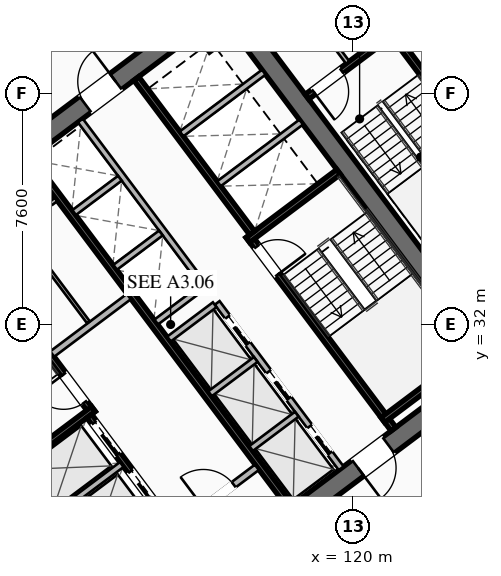
"""IFC4 building model, lengths in metres.
Left out: names, types, materials, properties, quantities, classifications, styles, units other than length and angle.
Written with IfcOpenShell. Run it as: python <this file> out.ifc"""

import sys

from ifc_helpers import new_model, si_unit, direction, frame, frame_2d, origin, place, context, subcontext, project, spatial, rectangle, extrude, element, fill, save


model = new_model("IFC4")
c1 = context("Model", 3, precision=1e-05, world=origin(), true_north=direction((0.0, 1.0)))
c2 = subcontext(c1, "Body", "Model", "MODEL_VIEW")
j1 = project(units=[si_unit("LENGTHUNIT", "METRE"), si_unit("PLANEANGLEUNIT", "RADIAN")], contexts=[c1])
p1 = place(None, origin())
s1 = spatial("IfcSite", under=j1, at=p1, CompositionType="ELEMENT")
p2 = place(p1, origin())
s2 = spatial("IfcBuilding", under=s1, at=p2, CompositionType="ELEMENT")
p3 = place(p2, frame((0.0, 0.0, 81.4)))
s3 = spatial("IfcBuildingStorey", under=s2, at=p3, CompositionType="ELEMENT", Elevation=81.4)
for number, where, z_axis, x_axis in (
    (1, (112.476, 21.107, 0.0), (0.0, 0.0, 1.0), (-0.6, 0.8, 0.0)),
    (2, (115.524, 42.893, 0.0), (0.0, 0.0, 1.0), (0.6, -0.8, 0.0)),
):
    element("IfcWall", number, at=place(p3, frame(where, z_axis=z_axis, x_axis=x_axis)), inside=s3, PredefinedType="SHEAR", context=c2, shape_type="SweptSolid", body=[
        extrude(rectangle(XDim=15.6, YDim=0.65, at=frame_2d((7.8, 0.0))), origin(), (0.0, 0.0, 1.0), 3.55),
    ])
p4 = place(p3, frame((124.429, 30.478, 0.0), z_axis=(0.0, 0.0, 1.0), x_axis=(-0.799998028465, -0.600002628705, 0.0)))
e3 = element("IfcWall", 3, at=p4, inside=s3, PredefinedType="SHEAR", context=c2, shape_type="SweptSolid", body=[
    extrude(rectangle(XDim=14.86, YDim=0.65, at=frame_2d((7.43, 0.0))), origin(), (0.0, 0.0, 1.0), 3.55),
])
p5 = place(p4, frame((9.13, 0.0, 0.0)))
e4 = element("IfcOpeningElement", 4, at=p5, cuts=e3, PredefinedType="OPENING", context=c2, shape_type="SweptSolid", body=[
    extrude(rectangle(XDim=1.25, YDim=2.25, at=frame_2d((0.625, 1.125))), frame((0.0, 0.335, 0.0), z_axis=(0.0, -1.0, 0.0), x_axis=(1.0, 0.0, 0.0)), (0.0, 0.0, 1.0), 0.67),
])
p6 = place(p4, frame((4.08, 0.0, 0.0)))
e5 = element("IfcOpeningElement", 5, at=p6, cuts=e3, PredefinedType="OPENING", context=c2, shape_type="SweptSolid", body=[
    extrude(rectangle(XDim=1.25, YDim=2.25, at=frame_2d((0.625, 1.125))), frame((0.0, 0.335, 0.0), z_axis=(0.0, -1.0, 0.0), x_axis=(1.0, 0.0, 0.0)), (0.0, 0.0, 1.0), 0.67),
])
p7 = place(p3, frame((103.571, 33.522, 0.0), z_axis=(0.0, 0.0, 1.0), x_axis=(0.799998028465, 0.600002628705, 0.0)))
e6 = element("IfcWall", 6, at=p7, inside=s3, PredefinedType="SHEAR", context=c2, shape_type="SweptSolid", body=[
    extrude(rectangle(XDim=14.86, YDim=0.65, at=frame_2d((7.43, 0.0))), origin(), (0.0, 0.0, 1.0), 3.55),
])
p8 = place(p7, frame((4.48, 0.0, 0.0)))
e7 = element("IfcOpeningElement", 7, at=p8, cuts=e6, PredefinedType="OPENING", context=c2, shape_type="SweptSolid", body=[
    extrude(rectangle(XDim=1.25, YDim=2.25, at=frame_2d((0.625, 1.125))), frame((0.0, 0.335, 0.0), z_axis=(0.0, -1.0, 0.0), x_axis=(1.0, 0.0, 0.0)), (0.0, 0.0, 1.0), 0.67),
])
p9 = place(p7, frame((9.53, 0.0, 0.0)))
e8 = element("IfcOpeningElement", 8, at=p9, cuts=e6, PredefinedType="OPENING", context=c2, shape_type="SweptSolid", body=[
    extrude(rectangle(XDim=1.25, YDim=2.25, at=frame_2d((0.625, 1.125))), frame((0.0, 0.335, 0.0), z_axis=(0.0, -1.0, 0.0), x_axis=(1.0, 0.0, 0.0)), (0.0, 0.0, 1.0), 0.67),
])
p10 = place(p3, frame((111.44, 29.08, 0.0), z_axis=(0.0, 0.0, 1.0), x_axis=(-0.600009827119, 0.799992629566, 0.0)))
e9 = element("IfcWall", 9, at=p10, inside=s3, PredefinedType="SHEAR", context=c2, shape_type="SweptSolid", body=[
    extrude(rectangle(XDim=7.95, YDim=0.2, at=frame_2d((3.975, 0.0))), origin(), (0.0, 0.0, 1.0), 3.35),
])
p11 = place(p10, frame((0.45, 0.0, 0.0)))
e10 = element("IfcOpeningElement", 10, at=p11, cuts=e9, PredefinedType="OPENING", context=c2, shape_type="SweptSolid", body=[
    extrude(rectangle(XDim=1.15, YDim=2.2, at=frame_2d((0.575, 1.1))), frame((0.0, 0.11, 0.0), z_axis=(0.0, -1.0, 0.0), x_axis=(1.0, 0.0, 0.0)), (0.0, 0.0, 1.0), 0.22),
])
p12 = place(p3, frame((108.476, 26.982, 0.0), z_axis=(0.0, 0.0, 1.0), x_axis=(0.799984290658, 0.600020945218, 0.0)))
e11 = element("IfcWall", 11, at=p12, inside=s3, PredefinedType="SHEAR", context=c2, shape_type="SweptSolid", body=[
    extrude(rectangle(XDim=3.73, YDim=0.2, at=frame_2d((1.865, 0.0))), origin(), (0.0, 0.0, 1.0), 3.35),
])
p13 = place(p3, frame((116.56, 34.92, 0.0), z_axis=(0.0, 0.0, 1.0), x_axis=(0.600009827119, -0.799992629566, 0.0)))
e12 = element("IfcWall", 12, at=p13, inside=s3, PredefinedType="SHEAR", context=c2, shape_type="SweptSolid", body=[
    extrude(rectangle(XDim=7.95, YDim=0.2, at=frame_2d((3.975, 0.0))), origin(), (0.0, 0.0, 1.0), 3.35),
])
p14 = place(p13, frame((0.45, 0.0, 0.0)))
e13 = element("IfcOpeningElement", 13, at=p14, cuts=e12, PredefinedType="OPENING", context=c2, shape_type="SweptSolid", body=[
    extrude(rectangle(XDim=1.15, YDim=2.2, at=frame_2d((0.575, 1.1))), frame((0.0, 0.11, 0.0), z_axis=(0.0, -1.0, 0.0), x_axis=(1.0, 0.0, 0.0)), (0.0, 0.0, 1.0), 0.22),
])
for number, where, z_axis, x_axis in (
    (14, (116.54, 34.78, 0.0), (0.0, 0.0, 1.0), (0.8, 0.6, 0.0)),
    (15, (120.98, 28.86, 0.0), (0.0, 0.0, 1.0), (0.8, 0.6, 0.0)),
):
    element("IfcWall", number, at=place(p3, frame(where, z_axis=z_axis, x_axis=x_axis)), inside=s3, PredefinedType="SHEAR", context=c2, shape_type="SweptSolid", body=[
        extrude(rectangle(XDim=3.73, YDim=0.2, at=frame_2d((1.865, 0.0))), origin(), (0.0, 0.0, 1.0), 3.35),
    ])
p15 = place(p3, frame((117.938, 26.016, 0.0), z_axis=(0.0, 0.0, 1.0), x_axis=(-0.600005463273, 0.799995902516, 0.0)))
e16 = element("IfcWall", 16, at=p15, inside=s3, PredefinedType="SHEAR", context=c2, shape_type="SweptSolid", body=[
    extrude(rectangle(XDim=14.3, YDim=0.2, at=frame_2d((7.15, 0.0))), origin(), (0.0, 0.0, 1.0), 3.35),
])
p16 = place(p3, frame((110.104, 31.028, 0.0), z_axis=(0.0, 0.0, 1.0), x_axis=(0.800018601094, 0.59997519774, 0.0)))
e17 = element("IfcWall", 17, at=p16, inside=s3, PredefinedType="SOLIDWALL", context=c2, shape_type="SweptSolid", body=[
    extrude(rectangle(XDim=3.15, YDim=0.22, at=frame_2d((1.575, 0.0))), origin(), (0.0, 0.0, 1.0), 2.703),
])
p17 = place(p3, frame((114.316, 25.412, 0.0), z_axis=(0.0, 0.0, 1.0), x_axis=(0.800018601094, 0.59997519774, 0.0)))
e18 = element("IfcWall", 18, at=p17, inside=s3, PredefinedType="SOLIDWALL", context=c2, shape_type="SweptSolid", body=[
    extrude(rectangle(XDim=3.15, YDim=0.22, at=frame_2d((1.575, 0.0))), origin(), (0.0, 0.0, 1.0), 2.703),
])
p18 = place(p17, frame((0.95, 0.0, 0.0)))
e19 = element("IfcOpeningElement", 19, at=p18, cuts=e18, PredefinedType="OPENING", context=c2, shape_type="SweptSolid", body=[
    extrude(rectangle(XDim=1.25, YDim=2.25, at=frame_2d((0.625, 1.125))), frame((0.0, 0.12, 0.0), z_axis=(0.0, -1.0, 0.0), x_axis=(1.0, 0.0, 0.0)), (0.0, 0.0, 1.0), 0.24),
])
p19 = place(p3, frame((115.13, 23.91, 0.0), z_axis=(0.0, 0.0, 1.0), x_axis=(-0.599975393228, 0.800018454488, 0.0)))
e20 = element("IfcWall", 20, at=p19, inside=s3, PredefinedType="SHEAR", context=c2, shape_type="SweptSolid", body=[
    extrude(rectangle(XDim=6.35, YDim=0.2, at=frame_2d((3.175, 0.0))), origin(), (0.0, 0.0, 1.0), 3.35),
])
p20 = place(p19, frame((4.775, 0.0, 0.0)))
e21 = element("IfcOpeningElement", 21, at=p20, cuts=e20, PredefinedType="OPENING", context=c2, shape_type="SweptSolid", body=[
    extrude(rectangle(XDim=1.3, YDim=2.25, at=frame_2d((0.65, 1.125))), frame((0.0, 0.11, 0.0), z_axis=(0.0, -1.0, 0.0), x_axis=(1.0, 0.0, 0.0)), (0.0, 0.0, 1.0), 0.22),
])
p21 = place(p19, frame((2.775, 0.0, 0.0)))
e22 = element("IfcOpeningElement", 22, at=p21, cuts=e20, PredefinedType="OPENING", context=c2, shape_type="SweptSolid", body=[
    extrude(rectangle(XDim=1.3, YDim=2.25, at=frame_2d((0.65, 1.125))), frame((0.0, 0.11, 0.0), z_axis=(0.0, -1.0, 0.0), x_axis=(1.0, 0.0, 0.0)), (0.0, 0.0, 1.0), 0.22),
])
p22 = place(p19, frame((0.575, 0.0, 0.0)))
e23 = element("IfcOpeningElement", 23, at=p22, cuts=e20, PredefinedType="OPENING", context=c2, shape_type="SweptSolid", body=[
    extrude(rectangle(XDim=1.3, YDim=2.25, at=frame_2d((0.65, 1.125))), frame((0.0, 0.11, 0.0), z_axis=(0.0, -1.0, 0.0), x_axis=(1.0, 0.0, 0.0)), (0.0, 0.0, 1.0), 0.22),
])
p23 = place(p3, frame((109.688, 25.366, 0.0), z_axis=(0.0, 0.0, 1.0), x_axis=(0.8, 0.6, 0.0)))
e24 = element("IfcWall", 24, at=p23, inside=s3, PredefinedType="SOLIDWALL", context=c2, shape_type="SweptSolid", body=[
    extrude(rectangle(XDim=3.38, YDim=0.2, at=frame_2d((1.69, 0.0))), origin(), (0.0, 0.0, 1.0), 3.35),
])
p24 = place(p3, frame((112.87, 40.09, 0.0), z_axis=(0.0, 0.0, 1.0), x_axis=(0.599975393228, -0.800018454488, 0.0)))
e25 = element("IfcWall", 25, at=p24, inside=s3, PredefinedType="SHEAR", context=c2, shape_type="SweptSolid", body=[
    extrude(rectangle(XDim=6.35, YDim=0.2, at=frame_2d((3.175, 0.0))), origin(), (0.0, 0.0, 1.0), 3.35),
])
for number, where, z_axis, x_axis in (
    (26, (115.59, 36.63, 0.0), (0.0, 0.0, 1.0), (0.8, 0.6, 0.0)),
    (27, (114.36, 38.27, 0.0), (0.0, 0.0, 1.0), (0.8, 0.6, 0.0)),
):
    element("IfcWall", number, at=place(p3, frame(where, z_axis=z_axis, x_axis=x_axis)), inside=s3, PredefinedType="SOLIDWALL", context=c2, shape_type="SweptSolid", body=[
        extrude(rectangle(XDim=3.38, YDim=0.2, at=frame_2d((1.69, 0.0))), origin(), (0.0, 0.0, 1.0), 3.35),
    ])
p25 = place(p3, frame((107.71, 34.22, 0.0), z_axis=(0.0, 0.0, 1.0), x_axis=(0.799981399002, 0.60002480053, 0.0)))
e28 = element("IfcWall", 28, at=p25, inside=s3, PredefinedType="PARTITIONING", context=c2, shape_type="SweptSolid", body=[
    extrude(rectangle(XDim=3.15, YDim=0.135, at=frame_2d((1.575, 0.0))), origin(), (0.0, 0.0, 1.0), 2.703),
])
p26 = place(p25, frame((0.25, 0.0, 0.0)))
e29 = element("IfcOpeningElement", 29, at=p26, cuts=e28, PredefinedType="OPENING", context=c2, shape_type="SweptSolid", body=[
    extrude(rectangle(XDim=0.95, YDim=2.05, at=frame_2d((0.475, 1.025))), frame((0.0, 0.077, 0.0), z_axis=(0.0, -1.0, 0.0), x_axis=(1.0, 0.0, 0.0)), (0.0, 0.0, 1.0), 0.155),
])
p27 = place(p25, frame((1.95, 0.0, 0.0)))
e30 = element("IfcOpeningElement", 30, at=p27, cuts=e28, PredefinedType="OPENING", context=c2, shape_type="SweptSolid", body=[
    extrude(rectangle(XDim=0.95, YDim=2.05, at=frame_2d((0.475, 1.025))), frame((0.0, 0.077, 0.0), z_axis=(0.0, -1.0, 0.0), x_axis=(1.0, 0.0, 0.0)), (0.0, 0.0, 1.0), 0.155),
])
p28 = place(p3, frame((111.296, 32.072, 0.0), z_axis=(0.0, 0.0, 1.0), x_axis=(-0.59995887973, 0.800030838552, 0.0)))
e31 = element("IfcWall", 31, at=p28, inside=s3, PredefinedType="PARTITIONING", context=c2, shape_type="SweptSolid", body=[
    extrude(rectangle(XDim=3.8, YDim=0.11, at=frame_2d((1.9, 0.0))), origin(), (0.0, 0.0, 1.0), 2.703),
])
p29 = place(p3, frame((119.61, 27.27, 0.0), z_axis=(0.0, 0.0, 1.0), x_axis=(-0.600011488909, 0.79999138319, 0.0)))
e32 = element("IfcWall", 32, at=p29, inside=s3, PredefinedType="SOLIDWALL", context=c2, shape_type="SweptSolid", body=[
    extrude(rectangle(XDim=6.8, YDim=0.2, at=frame_2d((3.4, 0.0))), origin(), (0.0, 0.0, 1.0), 3.35),
])
p30 = place(p29, frame((0.625, 0.0, 0.0)))
e33 = element("IfcOpeningElement", 33, at=p30, cuts=e32, PredefinedType="OPENING", context=c2, shape_type="SweptSolid", body=[
    extrude(rectangle(XDim=1.1, YDim=2.2, at=frame_2d((0.55, 1.1))), frame((0.0, 0.11, 0.0), z_axis=(0.0, -1.0, 0.0), x_axis=(1.0, 0.0, 0.0)), (0.0, 0.0, 1.0), 0.22),
])
p31 = place(p29, frame((2.875, 0.0, 0.0)))
e34 = element("IfcOpeningElement", 34, at=p31, cuts=e32, PredefinedType="OPENING", context=c2, shape_type="SweptSolid", body=[
    extrude(rectangle(XDim=1.1, YDim=2.2, at=frame_2d((0.55, 1.1))), frame((0.0, 0.11, 0.0), z_axis=(0.0, -1.0, 0.0), x_axis=(1.0, 0.0, 0.0)), (0.0, 0.0, 1.0), 0.22),
])
p32 = place(p29, frame((5.125, 0.0, 0.0)))
e35 = element("IfcOpeningElement", 35, at=p32, cuts=e32, PredefinedType="OPENING", context=c2, shape_type="SweptSolid", body=[
    extrude(rectangle(XDim=1.1, YDim=2.2, at=frame_2d((0.55, 1.1))), frame((0.0, 0.11, 0.0), z_axis=(0.0, -1.0, 0.0), x_axis=(1.0, 0.0, 0.0)), (0.0, 0.0, 1.0), 0.22),
])
p33 = place(p3, frame((116.646, 27.922, 0.0), z_axis=(0.0, 0.0, 1.0), x_axis=(0.8, 0.6, 0.0)))
e36 = element("IfcWall", 36, at=p33, inside=s3, PredefinedType="SOLIDWALL", context=c2, shape_type="SweptSolid", body=[
    extrude(rectangle(XDim=1.88, YDim=0.2, at=frame_2d((0.94, 0.0))), origin(), (0.0, 0.0, 1.0), 3.35),
])
p34 = place(p3, frame((115.296, 29.722, 0.0), z_axis=(0.0, 0.0, 1.0), x_axis=(0.799984418148, 0.600020775241, 0.0)))
e37 = element("IfcWall", 37, at=p34, inside=s3, PredefinedType="SOLIDWALL", context=c2, shape_type="SweptSolid", body=[
    extrude(rectangle(XDim=1.88, YDim=0.2, at=frame_2d((0.94, 0.0))), origin(), (0.0, 0.0, 1.0), 3.35),
])
p35 = place(p3, frame((113.946, 31.522, 0.0), z_axis=(0.0, 0.0, 1.0), x_axis=(0.8, 0.6, 0.0)))
e38 = element("IfcWall", 38, at=p35, inside=s3, PredefinedType="SOLIDWALL", context=c2, shape_type="SweptSolid", body=[
    extrude(rectangle(XDim=1.88, YDim=0.2, at=frame_2d((0.94, 0.0))), origin(), (0.0, 0.0, 1.0), 3.35),
])
p36 = place(p3, frame((115.11, 33.27, 0.0), z_axis=(0.0, 0.0, 1.0), x_axis=(-0.600011488909, 0.79999138319, 0.0)))
e39 = element("IfcWall", 39, at=p36, inside=s3, PredefinedType="SOLIDWALL", context=c2, shape_type="SweptSolid", body=[
    extrude(rectangle(XDim=6.8, YDim=0.2, at=frame_2d((3.4, 0.0))), origin(), (0.0, 0.0, 1.0), 3.35),
])
p37 = place(p3, frame((113.526, 32.082, 0.0), z_axis=(0.0, 0.0, 1.0), x_axis=(0.800046745961, 0.599937666993, 0.0)))
e40 = element("IfcWall", 40, at=p37, inside=s3, PredefinedType="SOLIDWALL", context=c2, shape_type="SweptSolid", body=[
    extrude(rectangle(XDim=1.88, YDim=0.2, at=frame_2d((0.94, 0.0))), origin(), (0.0, 0.0, 1.0), 3.35),
])
p38 = place(p3, frame((112.176, 33.882, 0.0), z_axis=(0.0, 0.0, 1.0), x_axis=(0.8, 0.6, 0.0)))
e41 = element("IfcWall", 41, at=p38, inside=s3, PredefinedType="SOLIDWALL", context=c2, shape_type="SweptSolid", body=[
    extrude(rectangle(XDim=1.88, YDim=0.2, at=frame_2d((0.94, 0.0))), origin(), (0.0, 0.0, 1.0), 3.35),
])
p39 = place(p3, frame((110.826, 35.682, 0.0), z_axis=(0.0, 0.0, 1.0), x_axis=(0.799984418148, 0.600020775241, 0.0)))
e42 = element("IfcWall", 42, at=p39, inside=s3, PredefinedType="SOLIDWALL", context=c2, shape_type="SweptSolid", body=[
    extrude(rectangle(XDim=1.88, YDim=0.2, at=frame_2d((0.94, 0.0))), origin(), (0.0, 0.0, 1.0), 3.35),
])
p40 = place(p3, frame((125.304, 36.228, 0.0), z_axis=(0.0, 0.0, 1.0), x_axis=(-0.59998851072, 0.800008616831, 0.0)))
e43 = element("IfcWall", 43, at=p40, inside=s3, PredefinedType="SHEAR", context=c2, shape_type="SweptSolid", body=[
    extrude(rectangle(XDim=6.8, YDim=0.2, at=frame_2d((3.4, 0.0))), origin(), (0.0, 0.0, 1.0), 3.35),
])
p41 = place(p3, frame((121.204, 41.528, 0.0), z_axis=(0.0, 0.0, 1.0), x_axis=(-0.800017232136, -0.599977023131, 0.0)))
e44 = element("IfcWall", 44, at=p41, inside=s3, PredefinedType="SHEAR", context=c2, shape_type="SweptSolid", body=[
    extrude(rectangle(XDim=3.4, YDim=0.2, at=frame_2d((1.7, 0.0))), origin(), (0.0, 0.0, 1.0), 3.35),
])
p42 = place(p41, frame((1.975, 0.0, 0.0)))
e45 = element("IfcOpeningElement", 45, at=p42, cuts=e44, PredefinedType="OPENING", context=c2, shape_type="SweptSolid", body=[
    extrude(rectangle(XDim=1.15, YDim=2.2, at=frame_2d((0.575, 1.1))), frame((0.0, 0.11, 0.0), z_axis=(0.0, -1.0, 0.0), x_axis=(1.0, 0.0, 0.0)), (0.0, 0.0, 1.0), 0.22),
])
p43 = place(p3, frame((119.824, 40.618, 0.0), z_axis=(0.0, 0.0, 1.0), x_axis=(-0.599982243973, 0.800013316712, 0.0)))
e46 = element("IfcWall", 46, at=p43, inside=s3, PredefinedType="PARTITIONING", context=c2, shape_type="SweptSolid", body=[
    extrude(rectangle(XDim=4.4, YDim=0.135, at=frame_2d((2.2, 0.0))), origin(), (0.0, 0.0, 1.0), 2.703),
])
p44 = place(p3, frame((98.516, 34.012, 0.0), z_axis=(0.0, 0.0, 1.0), x_axis=(0.8, 0.6, 0.0)))
e47 = element("IfcWall", 47, at=p44, inside=s3, PredefinedType="PARTITIONING", context=c2, shape_type="SweptSolid", body=[
    extrude(rectangle(XDim=28.23, YDim=0.135, at=frame_2d((14.115, 0.0))), origin(), (0.0, 0.0, 1.0), 2.703),
])
p45 = place(p44, frame((0.3, 0.0, 0.0)))
e48 = element("IfcOpeningElement", 48, at=p45, cuts=e47, PredefinedType="OPENING", context=c2, shape_type="SweptSolid", body=[
    extrude(rectangle(XDim=0.95, YDim=2.05, at=frame_2d((0.475, 1.025))), frame((0.0, 0.077, 0.0), z_axis=(0.0, -1.0, 0.0), x_axis=(1.0, 0.0, 0.0)), (0.0, 0.0, 1.0), 0.155),
])
p46 = place(p44, frame((10.792, 0.0, 0.0)))
e49 = element("IfcOpeningElement", 49, at=p46, cuts=e47, PredefinedType="OPENING", context=c2, shape_type="SweptSolid", body=[
    extrude(rectangle(XDim=0.95, YDim=2.05, at=frame_2d((0.475, 1.025))), frame((0.0, 0.077, 0.0), z_axis=(0.0, -1.0, 0.0), x_axis=(1.0, 0.0, 0.0)), (0.0, 0.0, 1.0), 0.155),
])
p47 = place(p44, frame((26.98, 0.0, 0.0)))
e50 = element("IfcOpeningElement", 50, at=p47, cuts=e47, PredefinedType="OPENING", context=c2, shape_type="SweptSolid", body=[
    extrude(rectangle(XDim=0.95, YDim=2.05, at=frame_2d((0.475, 1.025))), frame((0.0, 0.077, 0.0), z_axis=(0.0, -1.0, 0.0), x_axis=(1.0, 0.0, 0.0)), (0.0, 0.0, 1.0), 0.155),
])
p48 = place(p3, frame((134.402, 33.214, 0.0), z_axis=(0.0, 0.0, 1.0), x_axis=(-0.799995848831, -0.600005534853, 0.0)))
e51 = element("IfcWall", 51, at=p48, inside=s3, PredefinedType="PARTITIONING", context=c2, shape_type="SweptSolid", body=[
    extrude(rectangle(XDim=28.23, YDim=0.135, at=frame_2d((14.115, 0.0))), origin(), (0.0, 0.0, 1.0), 2.703),
])
p49 = place(p48, frame((26.9, 0.0, 0.0)))
e52 = element("IfcOpeningElement", 52, at=p49, cuts=e51, PredefinedType="OPENING", context=c2, shape_type="SweptSolid", body=[
    extrude(rectangle(XDim=0.95, YDim=2.05, at=frame_2d((0.475, 1.025))), frame((0.0, 0.077, 0.0), z_axis=(0.0, -1.0, 0.0), x_axis=(1.0, 0.0, 0.0)), (0.0, 0.0, 1.0), 0.155),
])
p50 = place(p48, frame((0.38, 0.0, 0.0)))
e53 = element("IfcOpeningElement", 53, at=p50, cuts=e51, PredefinedType="OPENING", context=c2, shape_type="SweptSolid", body=[
    extrude(rectangle(XDim=0.95, YDim=2.05, at=frame_2d((0.475, 1.025))), frame((0.0, 0.077, 0.0), z_axis=(0.0, -1.0, 0.0), x_axis=(1.0, 0.0, 0.0)), (0.0, 0.0, 1.0), 0.155),
])
p51 = place(p3, frame((111.77, 16.34, 0.0), z_axis=(0.0, 0.0, 1.0), x_axis=(-0.600003549523, 0.799997337845, 0.0)))
e54 = element("IfcWall", 54, at=p51, inside=s3, PredefinedType="PARTITIONING", context=c2, shape_type="SweptSolid", body=[
    extrude(rectangle(XDim=22.01, YDim=0.135, at=frame_2d((11.005, 0.0))), origin(), (0.0, 0.0, 1.0), 2.703),
])
p52 = place(p51, frame((0.3, 0.0, 0.0)))
e55 = element("IfcOpeningElement", 55, at=p52, cuts=e54, PredefinedType="OPENING", context=c2, shape_type="SweptSolid", body=[
    extrude(rectangle(XDim=0.95, YDim=2.05, at=frame_2d((0.475, 1.025))), frame((0.0, 0.077, 0.0), z_axis=(0.0, -1.0, 0.0), x_axis=(1.0, 0.0, 0.0)), (0.0, 0.0, 1.0), 0.155),
])
p53 = place(p9, origin())
e56 = element("IfcDoor", 56, at=p53, inside=s3, OperationType="SINGLE_SWING_RIGHT", PredefinedType="DOOR", context=c2, shape_type="SweptSolid", body=[
    extrude(rectangle(XDim=1.25, YDim=2.25, at=frame_2d((0.625, 1.125))), frame((0.0, 0.025, 0.0), z_axis=(0.0, -1.0, 0.0), x_axis=(1.0, 0.0, 0.0)), (0.0, 0.0, 1.0), 0.05),
])
fill(e8, e56)
p54 = place(p6, origin())
e57 = element("IfcDoor", 57, at=p54, inside=s3, OperationType="SINGLE_SWING_RIGHT", PredefinedType="DOOR", context=c2, shape_type="SweptSolid", body=[
    extrude(rectangle(XDim=1.25, YDim=2.25, at=frame_2d((0.625, 1.125))), frame((0.0, 0.025, 0.0), z_axis=(0.0, -1.0, 0.0), x_axis=(1.0, 0.0, 0.0)), (0.0, 0.0, 1.0), 0.05),
])
fill(e5, e57)
p55 = place(p11, origin())
e58 = element("IfcDoor", 58, at=p55, inside=s3, OperationType="SINGLE_SWING_RIGHT", PredefinedType="DOOR", context=c2, shape_type="SweptSolid", body=[
    extrude(rectangle(XDim=1.15, YDim=2.2, at=frame_2d((0.575, 1.1))), frame((0.0, 0.025, 0.0), z_axis=(0.0, -1.0, 0.0), x_axis=(1.0, 0.0, 0.0)), (0.0, 0.0, 1.0), 0.05),
])
fill(e10, e58)
p56 = place(p14, origin())
e59 = element("IfcDoor", 59, at=p56, inside=s3, OperationType="SINGLE_SWING_RIGHT", PredefinedType="DOOR", context=c2, shape_type="SweptSolid", body=[
    extrude(rectangle(XDim=1.15, YDim=2.2, at=frame_2d((0.575, 1.1))), frame((0.0, 0.025, 0.0), z_axis=(0.0, -1.0, 0.0), x_axis=(1.0, 0.0, 0.0)), (0.0, 0.0, 1.0), 0.05),
])
fill(e13, e59)
p57 = place(p18, origin())
e60 = element("IfcDoor", 60, at=p57, inside=s3, OperationType="SINGLE_SWING_LEFT", PredefinedType="DOOR", context=c2, shape_type="SweptSolid", body=[
    extrude(rectangle(XDim=1.25, YDim=2.25, at=frame_2d((0.625, 1.125))), frame((0.0, 0.025, 0.0), z_axis=(0.0, -1.0, 0.0), x_axis=(1.0, 0.0, 0.0)), (0.0, 0.0, 1.0), 0.05),
])
fill(e19, e60)
p58 = place(p42, origin())
e61 = element("IfcDoor", 61, at=p58, inside=s3, OperationType="SINGLE_SWING_RIGHT", PredefinedType="DOOR", context=c2, shape_type="SweptSolid", body=[
    extrude(rectangle(XDim=1.15, YDim=2.2, at=frame_2d((0.575, 1.1))), frame((0.0, 0.025, 0.0), z_axis=(0.0, -1.0, 0.0), x_axis=(1.0, 0.0, 0.0)), (0.0, 0.0, 1.0), 0.05),
])
fill(e45, e61)
p59 = place(p20, origin())
e62 = element("IfcDoor", 62, at=p59, inside=s3, OperationType="SLIDING_TO_LEFT", PredefinedType="DOOR", context=c2, shape_type="SweptSolid", body=[
    extrude(rectangle(XDim=1.3, YDim=2.25, at=frame_2d((0.65, 1.125))), frame((0.0, 0.025, 0.0), z_axis=(0.0, -1.0, 0.0), x_axis=(1.0, 0.0, 0.0)), (0.0, 0.0, 1.0), 0.05),
])
fill(e21, e62)
p60 = place(p21, origin())
e63 = element("IfcDoor", 63, at=p60, inside=s3, OperationType="SLIDING_TO_LEFT", PredefinedType="DOOR", context=c2, shape_type="SweptSolid", body=[
    extrude(rectangle(XDim=1.3, YDim=2.25, at=frame_2d((0.65, 1.125))), frame((0.0, 0.025, 0.0), z_axis=(0.0, -1.0, 0.0), x_axis=(1.0, 0.0, 0.0)), (0.0, 0.0, 1.0), 0.05),
])
fill(e22, e63)
p61 = place(p30, origin())
e64 = element("IfcDoor", 64, at=p61, inside=s3, OperationType="SLIDING_TO_LEFT", PredefinedType="DOOR", context=c2, shape_type="SweptSolid", body=[
    extrude(rectangle(XDim=1.1, YDim=2.2, at=frame_2d((0.55, 1.1))), frame((0.0, 0.025, 0.0), z_axis=(0.0, -1.0, 0.0), x_axis=(1.0, 0.0, 0.0)), (0.0, 0.0, 1.0), 0.05),
])
fill(e33, e64)
p62 = place(p31, origin())
e65 = element("IfcDoor", 65, at=p62, inside=s3, OperationType="SLIDING_TO_LEFT", PredefinedType="DOOR", context=c2, shape_type="SweptSolid", body=[
    extrude(rectangle(XDim=1.1, YDim=2.2, at=frame_2d((0.55, 1.1))), frame((0.0, 0.025, 0.0), z_axis=(0.0, -1.0, 0.0), x_axis=(1.0, 0.0, 0.0)), (0.0, 0.0, 1.0), 0.05),
])
fill(e34, e65)
p63 = place(p32, origin())
e66 = element("IfcDoor", 66, at=p63, inside=s3, OperationType="SLIDING_TO_LEFT", PredefinedType="DOOR", context=c2, shape_type="SweptSolid", body=[
    extrude(rectangle(XDim=1.1, YDim=2.2, at=frame_2d((0.55, 1.1))), frame((0.0, 0.025, 0.0), z_axis=(0.0, -1.0, 0.0), x_axis=(1.0, 0.0, 0.0)), (0.0, 0.0, 1.0), 0.05),
])
fill(e35, e66)
save(model, sys.argv[1])
